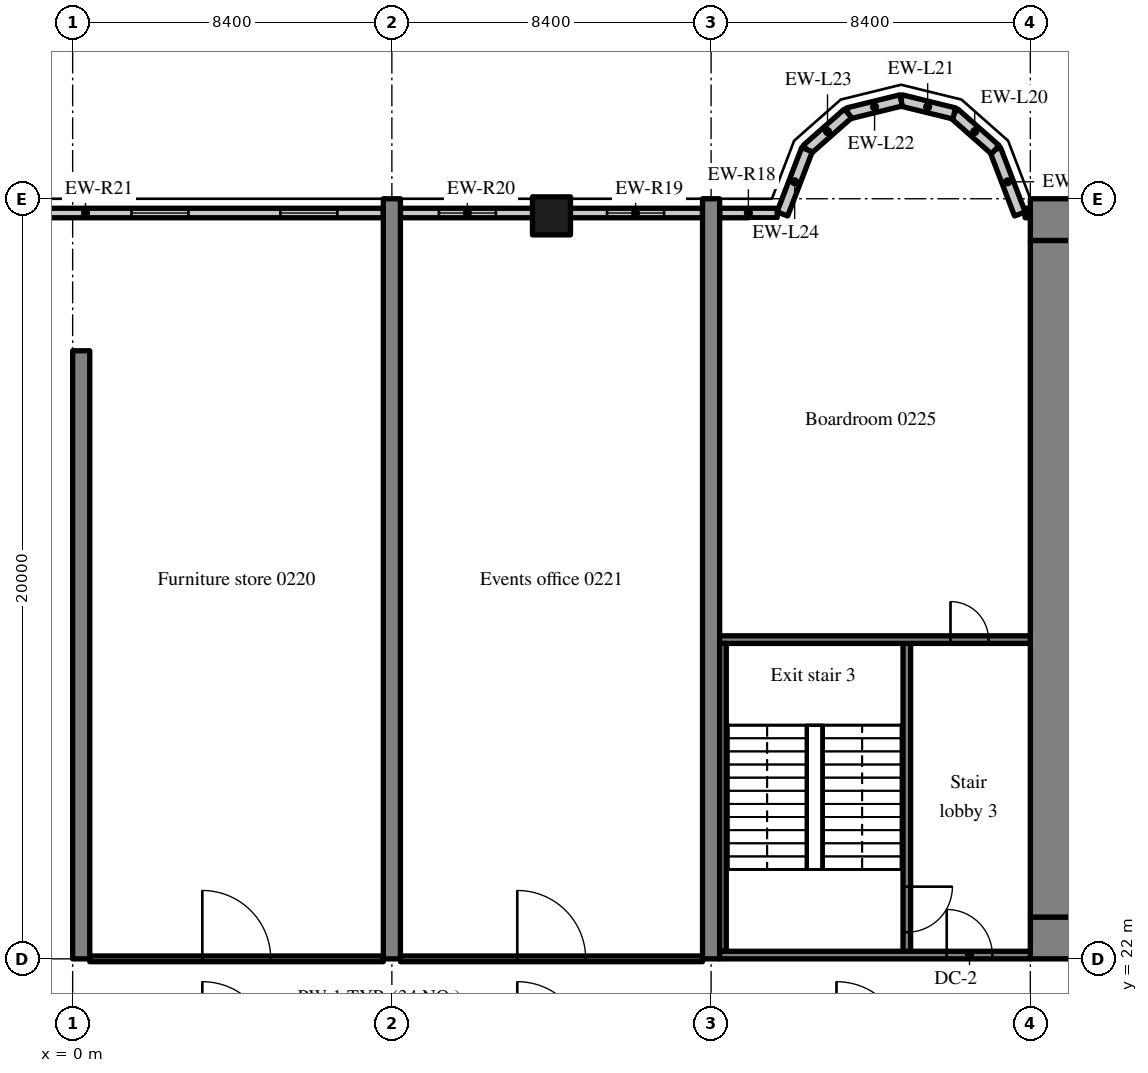
"""IFC4 building model, lengths in metres.
Left out: names, types, materials, properties, quantities, classifications, styles, units other than length and angle.
Written with IfcOpenShell. Run it as: python <this file> out.ifc"""

import sys

from ifc_helpers import new_model, si_unit, direction, frame, frame_2d, origin, origin_2d, place, context, subcontext, project, spatial, rectangle, extrude, source, transform, mapped, element, fill, save


model = new_model("IFC4")
c1 = context("Model", 3, precision=1e-05, world=origin(), true_north=direction((0.0, 1.0)))
c2 = subcontext(c1, "Body", "Model", "MODEL_VIEW")
j1 = project(units=[si_unit("LENGTHUNIT", "METRE"), si_unit("PLANEANGLEUNIT", "RADIAN")], contexts=[c1])
p1 = place(None, origin())
s1 = spatial("IfcSite", under=j1, at=p1, CompositionType="ELEMENT")
p2 = place(p1, origin())
s2 = spatial("IfcBuilding", under=s1, at=p2, CompositionType="ELEMENT")
p3 = place(p2, frame((0.0, 0.0, 11.4)))
s3 = spatial("IfcBuildingStorey", under=s2, at=p3, CompositionType="ELEMENT", Elevation=11.4)
m1 = source(origin(), c2, "Body", "SweptSolid", [
    extrude(rectangle(XDim=50.4, YDim=1.1, at=frame_2d((25.2, 0.0))), origin(), (0.0, 0.0, 1.0), 6.32),
])
p4 = place(p3, frame((25.2, 22.55, 0.0), z_axis=(0.0, 0.0, 1.0), x_axis=(1.0, 0.0, 0.0)))
e1 = element("IfcWall", 1, at=p4, inside=s3, PredefinedType="SHEAR", context=c2, shape_type="MappedRepresentation", body=[
    mapped(m1, transform((0.0, 0.0, 0.0), scale=1.0)),
])
m2 = source(origin(), c2, "Body", "SweptSolid", [
    extrude(rectangle(XDim=1.8, YDim=2.1, at=frame_2d((0.9, 1.05))), frame((0.0, 0.56, 0.0), z_axis=(0.0, -1.0, 0.0), x_axis=(1.0, 0.0, 0.0)), (0.0, 0.0, 1.0), 1.12),
])
p5 = place(p4, frame((15.9, 0.0, 0.0)))
e2 = element("IfcOpeningElement", 2, at=p5, cuts=e1, PredefinedType="OPENING", context=c2, shape_type="MappedRepresentation", body=[
    mapped(m2, transform((0.0, 0.0, 0.0), scale=1.0)),
])
m3 = source(origin(), c2, "Body", "SweptSolid", [
    extrude(rectangle(XDim=1.2, YDim=2.1, at=frame_2d((0.6, 1.05))), frame((0.0, 0.56, 0.0), z_axis=(0.0, -1.0, 0.0), x_axis=(1.0, 0.0, 0.0)), (0.0, 0.0, 1.0), 1.12),
])
p6 = place(p4, frame((27.0, 0.0, 0.0)))
e3 = element("IfcOpeningElement", 3, at=p6, cuts=e1, PredefinedType="OPENING", context=c2, shape_type="MappedRepresentation", body=[
    mapped(m3, transform((0.0, 0.0, 0.0), scale=1.0)),
])
m4 = source(origin(), c2, "Body", "SweptSolid", [
    extrude(rectangle(XDim=0.9, YDim=2.1, at=frame_2d((0.45, 1.05))), frame((0.0, 0.56, 0.0), z_axis=(0.0, -1.0, 0.0), x_axis=(1.0, 0.0, 0.0)), (0.0, 0.0, 1.0), 1.12),
])
p7 = place(p4, frame((34.5, 0.0, 0.0)))
e4 = element("IfcOpeningElement", 4, at=p7, cuts=e1, PredefinedType="OPENING", context=c2, shape_type="MappedRepresentation", body=[
    mapped(m4, transform((0.0, 0.0, 0.0), scale=1.0)),
])
p8 = place(p4, frame((31.5, 0.0, 0.0)))
e5 = element("IfcOpeningElement", 5, at=p8, cuts=e1, PredefinedType="OPENING", context=c2, shape_type="MappedRepresentation", body=[
    mapped(m4, transform((0.0, 0.0, 0.0), scale=1.0)),
])
p9 = place(p4, frame((39.75, 0.0, 0.0)))
e6 = element("IfcOpeningElement", 6, at=p9, cuts=e1, PredefinedType="OPENING", context=c2, shape_type="MappedRepresentation", body=[
    mapped(m4, transform((0.0, 0.0, 0.0), scale=1.0)),
])
p10 = place(p4, frame((36.75, 0.0, 0.0)))
e7 = element("IfcOpeningElement", 7, at=p10, cuts=e1, PredefinedType="OPENING", context=c2, shape_type="MappedRepresentation", body=[
    mapped(m4, transform((0.0, 0.0, 0.0), scale=1.0)),
])
p11 = place(p4, frame((6.425, 0.0, 0.0)))
e8 = element("IfcOpeningElement", 8, at=p11, cuts=e1, PredefinedType="OPENING", context=c2, shape_type="MappedRepresentation", body=[
    mapped(m3, transform((0.0, 0.0, 0.0), scale=1.0)),
])
p12 = place(p4, frame((47.675, 0.0, 0.0)))
e9 = element("IfcOpeningElement", 9, at=p12, cuts=e1, PredefinedType="OPENING", context=c2, shape_type="MappedRepresentation", body=[
    mapped(m3, transform((0.0, 0.0, 0.0), scale=1.0)),
])
p13 = place(p3, frame((25.2, 41.45, 0.0), z_axis=(0.0, 0.0, 1.0), x_axis=(1.0, 0.0, 0.0)))
e10 = element("IfcWall", 10, at=p13, inside=s3, PredefinedType="SHEAR", context=c2, shape_type="MappedRepresentation", body=[
    mapped(m1, transform((0.0, 0.0, 0.0), scale=1.0)),
])
m5 = source(origin(), c2, "Body", "SweptSolid", [
    extrude(rectangle(XDim=17.8, YDim=1.1, at=frame_2d((8.9, 0.0))), origin(), (0.0, 0.0, 1.0), 6.32),
])
p14 = place(p3, frame((25.75, 23.1, 0.0), z_axis=(0.0, 0.0, 1.0), x_axis=(0.0, 1.0, 0.0)))
e11 = element("IfcWall", 11, at=p14, inside=s3, PredefinedType="SHEAR", context=c2, shape_type="MappedRepresentation", body=[
    mapped(m5, transform((0.0, 0.0, 0.0), scale=1.0)),
])
m6 = source(origin(), c2, "Body", "SweptSolid", [
    extrude(rectangle(XDim=16.0, YDim=0.45, at=frame_2d((8.0, 0.0))), origin(), (0.0, 0.0, 1.0), 6.32),
])
p15 = place(p3, frame((0.225, 22.0, 0.0), z_axis=(0.0, 0.0, 1.0), x_axis=(0.0, 1.0, 0.0)))
e12 = element("IfcWall", 12, at=p15, inside=s3, PredefinedType="SHEAR", context=c2, shape_type="MappedRepresentation", body=[
    mapped(m6, transform((0.0, 0.0, 0.0), scale=1.0)),
])
m7 = source(origin(), c2, "Body", "SweptSolid", [
    extrude(rectangle(XDim=20.0, YDim=0.45, at=frame_2d((10.0, 0.0))), origin(), (0.0, 0.0, 1.0), 6.32),
])
for number, where, z_axis, x_axis in (
    (13, (8.4, 22.0, 0.0), (0.0, 0.0, 1.0), (0.0, 1.0, 0.0)),
    (14, (16.8, 22.0, 0.0), (0.0, 0.0, 1.0), (0.0, 1.0, 0.0)),
):
    element("IfcWall", number, at=place(p3, frame(where, z_axis=z_axis, x_axis=x_axis)), inside=s3, PredefinedType="SHEAR", context=c2, shape_type="MappedRepresentation", body=[
        mapped(m7, transform((0.0, 0.0, 0.0), scale=1.0)),
    ])
m8 = source(origin(), c2, "Body", "SweptSolid", [
    extrude(rectangle(XDim=1.0, YDim=1.0, at=origin_2d()), origin(), (0.0, 0.0, 1.0), 6.32),
])
p16 = place(p3, frame((12.6, 41.55, 0.0), z_axis=(0.0, 0.0, 1.0), x_axis=(1.0, 0.0, 0.0)))
e15 = element("IfcColumn", 15, at=p16, inside=s3, PredefinedType="COLUMN", context=c2, shape_type="MappedRepresentation", body=[
    mapped(m8, transform((0.0, 0.0, 0.0), scale=1.0)),
])
m9 = source(origin(), c2, "Body", "SweptSolid", [
    extrude(rectangle(XDim=0.138, YDim=0.25, at=frame_2d((0.069, 0.0))), origin(), (0.0, 0.0, 1.0), 5.57),
])
p17 = place(p3, frame((25.2, 41.625, 0.0), z_axis=(0.0, 0.0, 1.0), x_axis=(-1.0, 0.0, 0.0)))
e16 = element("IfcWall", 16, at=p17, inside=s3, PredefinedType="SOLIDWALL", context=c2, shape_type="MappedRepresentation", body=[
    mapped(m9, transform((0.0, 0.0, 0.0), scale=1.0)),
])
m10 = source(origin(), c2, "Body", "SweptSolid", [
    extrude(rectangle(XDim=1.812, YDim=0.3, at=frame_2d((0.906, 0.0))), origin(), (0.0, 0.0, 1.0), 6.32),
])
p18 = place(p3, frame((24.925, 41.6, 0.0), z_axis=(0.0, 0.0, 1.0), x_axis=(-0.357759776872, 0.933813654886, 0.0)))
e17 = element("IfcWall", 17, at=p18, inside=s3, PredefinedType="SOLIDWALL", context=c2, shape_type="MappedRepresentation", body=[
    mapped(m10, transform((0.0, 0.0, 0.0), scale=1.0)),
])
m11 = source(origin(), c2, "Body", "SweptSolid", [
    extrude(rectangle(XDim=1.44, YDim=0.3, at=frame_2d((0.72, 0.0))), origin(), (0.0, 0.0, 1.0), 6.32),
])
p19 = place(p3, frame((24.277, 43.292, 0.0), z_axis=(0.0, 0.0, 1.0), x_axis=(-0.749649827867, 0.661834673902, 0.0)))
e18 = element("IfcWall", 18, at=p19, inside=s3, PredefinedType="SOLIDWALL", context=c2, shape_type="MappedRepresentation", body=[
    mapped(m11, transform((0.0, 0.0, 0.0), scale=1.0)),
])
m12 = source(origin(), c2, "Body", "SweptSolid", [
    extrude(rectangle(XDim=1.438, YDim=0.3, at=frame_2d((0.719, 0.0))), origin(), (0.0, 0.0, 1.0), 6.32),
])
p20 = place(p3, frame((23.197, 44.245, 0.0), z_axis=(0.0, 0.0, 1.0), x_axis=(-0.971152283879, 0.238460146601, 0.0)))
e19 = element("IfcWall", 19, at=p20, inside=s3, PredefinedType="SOLIDWALL", context=c2, shape_type="MappedRepresentation", body=[
    mapped(m12, transform((0.0, 0.0, 0.0), scale=1.0)),
])
m13 = source(origin(), c2, "Body", "SweptSolid", [
    extrude(rectangle(XDim=1.439, YDim=0.3, at=frame_2d((0.719, 0.0))), origin(), (0.0, 0.0, 1.0), 6.32),
])
p21 = place(p3, frame((21.8, 44.588, 0.0), z_axis=(0.0, 0.0, 1.0), x_axis=(-0.971161932466, -0.238420848351, 0.0)))
e20 = element("IfcWall", 20, at=p21, inside=s3, PredefinedType="SOLIDWALL", context=c2, shape_type="MappedRepresentation", body=[
    mapped(m13, transform((0.0, 0.0, 0.0), scale=1.0)),
])
m14 = source(origin(), c2, "Body", "SweptSolid", [
    extrude(rectangle(XDim=1.44, YDim=0.3, at=frame_2d((0.72, 0.0))), origin(), (0.0, 0.0, 1.0), 6.32),
])
p22 = place(p3, frame((20.403, 44.245, 0.0), z_axis=(0.0, 0.0, 1.0), x_axis=(-0.74957555648, -0.661918790432, 0.0)))
e21 = element("IfcWall", 21, at=p22, inside=s3, PredefinedType="SOLIDWALL", context=c2, shape_type="MappedRepresentation", body=[
    mapped(m14, transform((0.0, 0.0, 0.0), scale=1.0)),
])
m15 = source(origin(), c2, "Body", "SweptSolid", [
    extrude(rectangle(XDim=1.812, YDim=0.3, at=frame_2d((0.906, 0.0))), origin(), (0.0, 0.0, 1.0), 6.32),
])
p23 = place(p3, frame((19.323, 43.292, 0.0), z_axis=(0.0, 0.0, 1.0), x_axis=(-0.357877270961, -0.93376863244, 0.0)))
e22 = element("IfcWall", 22, at=p23, inside=s3, PredefinedType="SOLIDWALL", context=c2, shape_type="MappedRepresentation", body=[
    mapped(m15, transform((0.0, 0.0, 0.0), scale=1.0)),
])
m16 = source(origin(), c2, "Body", "SweptSolid", [
    extrude(rectangle(XDim=1.513, YDim=0.25, at=frame_2d((0.756, 0.0))), origin(), (0.0, 0.0, 1.0), 5.57),
])
p24 = place(p3, frame((18.538, 41.625, 0.0), z_axis=(0.0, 0.0, 1.0), x_axis=(-1.0, 0.0, 0.0)))
e23 = element("IfcWall", 23, at=p24, inside=s3, PredefinedType="SOLIDWALL", context=c2, shape_type="MappedRepresentation", body=[
    mapped(m16, transform((0.0, 0.0, 0.0), scale=1.0)),
])
m17 = source(origin(), c2, "Body", "SweptSolid", [
    extrude(rectangle(XDim=3.525, YDim=0.25, at=frame_2d((1.762, 0.0))), origin(), (0.0, 0.0, 1.0), 5.57),
])
p25 = place(p3, frame((16.575, 41.625, 0.0), z_axis=(0.0, 0.0, 1.0), x_axis=(-1.0, 0.0, 0.0)))
e24 = element("IfcWall", 24, at=p25, inside=s3, PredefinedType="SOLIDWALL", context=c2, shape_type="MappedRepresentation", body=[
    mapped(m17, transform((0.0, 0.0, 0.0), scale=1.0)),
])
m18 = source(origin(), c2, "Body", "SweptSolid", [
    extrude(rectangle(XDim=1.5, YDim=1.5, at=frame_2d((0.75, 0.75))), frame((0.0, 0.135, 0.0), z_axis=(0.0, -1.0, 0.0), x_axis=(1.0, 0.0, 0.0)), (0.0, 0.0, 1.0), 0.27),
])
p26 = place(p25, frame((1.012, 0.0, 0.9)))
e25 = element("IfcOpeningElement", 25, at=p26, cuts=e24, PredefinedType="OPENING", context=c2, shape_type="MappedRepresentation", body=[
    mapped(m18, transform((0.0, 0.0, 0.0), scale=1.0)),
])
p27 = place(p3, frame((12.15, 41.625, 0.0), z_axis=(0.0, 0.0, 1.0), x_axis=(-1.0, 0.0, 0.0)))
e26 = element("IfcWall", 26, at=p27, inside=s3, PredefinedType="SOLIDWALL", context=c2, shape_type="MappedRepresentation", body=[
    mapped(m17, transform((0.0, 0.0, 0.0), scale=1.0)),
])
p28 = place(p27, frame((1.012, 0.0, 0.9)))
e27 = element("IfcOpeningElement", 27, at=p28, cuts=e26, PredefinedType="OPENING", context=c2, shape_type="MappedRepresentation", body=[
    mapped(m18, transform((0.0, 0.0, 0.0), scale=1.0)),
])
m19 = source(origin(), c2, "Body", "SweptSolid", [
    extrude(rectangle(XDim=15.675, YDim=0.25, at=frame_2d((7.837, 0.0))), origin(), (0.0, 0.0, 1.0), 5.57),
])
p29 = place(p3, frame((8.175, 41.625, 0.0), z_axis=(0.0, 0.0, 1.0), x_axis=(-1.0, 0.0, 0.0)))
e28 = element("IfcWall", 28, at=p29, inside=s3, PredefinedType="SOLIDWALL", context=c2, shape_type="MappedRepresentation", body=[
    mapped(m19, transform((0.0, 0.0, 0.0), scale=1.0)),
])
p30 = place(p29, frame((1.209, 0.0, 0.9)))
e29 = element("IfcOpeningElement", 29, at=p30, cuts=e28, PredefinedType="OPENING", context=c2, shape_type="MappedRepresentation", body=[
    mapped(m18, transform((0.0, 0.0, 0.0), scale=1.0)),
])
p31 = place(p29, frame((5.128, 0.0, 0.9)))
e30 = element("IfcOpeningElement", 30, at=p31, cuts=e28, PredefinedType="OPENING", context=c2, shape_type="MappedRepresentation", body=[
    mapped(m18, transform((0.0, 0.0, 0.0), scale=1.0)),
])
p32 = place(p29, frame((9.047, 0.0, 0.9)))
e31 = element("IfcOpeningElement", 31, at=p32, cuts=e28, PredefinedType="OPENING", context=c2, shape_type="MappedRepresentation", body=[
    mapped(m18, transform((0.0, 0.0, 0.0), scale=1.0)),
])
p33 = place(p29, frame((12.966, 0.0, 0.9)))
e32 = element("IfcOpeningElement", 32, at=p33, cuts=e28, PredefinedType="OPENING", context=c2, shape_type="MappedRepresentation", body=[
    mapped(m18, transform((0.0, 0.0, 0.0), scale=1.0)),
])
m20 = source(origin(), c2, "Body", "SweptSolid", [
    extrude(rectangle(XDim=8.3, YDim=0.2, at=frame_2d((4.15, 0.0))), origin(), (0.0, 0.0, 1.0), 6.32),
])
p34 = place(p3, frame((21.95, 22.1, 0.0), z_axis=(0.0, 0.0, 1.0), x_axis=(0.0, 1.0, 0.0)))
e33 = element("IfcWall", 33, at=p34, inside=s3, PredefinedType="SOLIDWALL", context=c2, shape_type="MappedRepresentation", body=[
    mapped(m20, transform((0.0, 0.0, 0.0), scale=1.0)),
])
m21 = source(origin(), c2, "Body", "SweptSolid", [
    extrude(rectangle(XDim=1.2, YDim=2.1, at=frame_2d((0.6, 1.05))), frame((0.0, 0.11, 0.0), z_axis=(0.0, -1.0, 0.0), x_axis=(1.0, 0.0, 0.0)), (0.0, 0.0, 1.0), 0.22),
])
p35 = place(p34, frame((0.6, 0.0, 0.0)))
e34 = element("IfcOpeningElement", 34, at=p35, cuts=e33, PredefinedType="OPENING", context=c2, shape_type="MappedRepresentation", body=[
    mapped(m21, transform((0.0, 0.0, 0.0), scale=1.0)),
])
m22 = source(origin(), c2, "Body", "SweptSolid", [
    extrude(rectangle(XDim=8.175, YDim=0.2, at=frame_2d((4.087, 0.0))), origin(), (0.0, 0.0, 1.0), 6.32),
])
p36 = place(p3, frame((17.025, 22.1, 0.0), z_axis=(0.0, 0.0, 1.0), x_axis=(1.0, 0.0, 0.0)))
e35 = element("IfcWall", 35, at=p36, inside=s3, PredefinedType="SOLIDWALL", context=c2, shape_type="MappedRepresentation", body=[
    mapped(m22, transform((0.0, 0.0, 0.0), scale=1.0)),
])
p37 = place(p36, frame((5.975, 0.0, 0.0)))
e36 = element("IfcOpeningElement", 36, at=p37, cuts=e35, PredefinedType="OPENING", context=c2, shape_type="MappedRepresentation", body=[
    mapped(m21, transform((0.0, 0.0, 0.0), scale=1.0)),
])
p38 = place(p3, frame((17.025, 30.4, 0.0), z_axis=(0.0, 0.0, 1.0), x_axis=(1.0, 0.0, 0.0)))
e37 = element("IfcWall", 37, at=p38, inside=s3, PredefinedType="SOLIDWALL", context=c2, shape_type="MappedRepresentation", body=[
    mapped(m22, transform((0.0, 0.0, 0.0), scale=1.0)),
])
m23 = source(origin(), c2, "Body", "SweptSolid", [
    extrude(rectangle(XDim=1.0, YDim=2.1, at=frame_2d((0.5, 1.05))), frame((0.0, 0.11, 0.0), z_axis=(0.0, -1.0, 0.0), x_axis=(1.0, 0.0, 0.0)), (0.0, 0.0, 1.0), 0.22),
])
p39 = place(p38, frame((6.075, 0.0, 0.0)))
e38 = element("IfcOpeningElement", 38, at=p39, cuts=e37, PredefinedType="OPENING", context=c2, shape_type="MappedRepresentation", body=[
    mapped(m23, transform((0.0, 0.0, 0.0), scale=1.0)),
])
m24 = source(origin(), c2, "Body", "SweptSolid", [
    extrude(rectangle(XDim=8.1, YDim=0.175, at=frame_2d((4.05, 0.0))), origin(), (0.0, 0.0, 1.0), 6.32),
])
p40 = place(p3, frame((17.112, 22.2, 0.0), z_axis=(0.0, 0.0, 1.0), x_axis=(0.0, 1.0, 0.0)))
e39 = element("IfcWall", 39, at=p40, inside=s3, PredefinedType="SOLIDWALL", context=c2, shape_type="MappedRepresentation", body=[
    mapped(m24, transform((0.0, 0.0, 0.0), scale=1.0)),
])
m25 = source(origin(), c2, "Body", "SweptSolid", [
    extrude(rectangle(XDim=7.725, YDim=0.15, at=frame_2d((3.863, 0.0))), origin(), (0.0, 0.0, 1.0), 5.62),
])
p41 = place(p3, frame((0.45, 22.0, 0.0), z_axis=(0.0, 0.0, 1.0), x_axis=(1.0, 0.0, 0.0)))
e40 = element("IfcWall", 40, at=p41, inside=s3, PredefinedType="PARTITIONING", context=c2, shape_type="MappedRepresentation", body=[
    mapped(m25, transform((0.0, 0.0, 0.0), scale=1.0)),
])
m26 = source(origin(), c2, "Body", "SweptSolid", [
    extrude(rectangle(XDim=1.8, YDim=2.1, at=frame_2d((0.9, 1.05))), frame((0.0, 0.085, 0.0), z_axis=(0.0, -1.0, 0.0), x_axis=(1.0, 0.0, 0.0)), (0.0, 0.0, 1.0), 0.17),
])
p42 = place(p41, frame((2.962, 0.0, 0.0)))
e41 = element("IfcOpeningElement", 41, at=p42, cuts=e40, PredefinedType="OPENING", context=c2, shape_type="MappedRepresentation", body=[
    mapped(m26, transform((0.0, 0.0, 0.0), scale=1.0)),
])
m27 = source(origin(), c2, "Body", "SweptSolid", [
    extrude(rectangle(XDim=7.95, YDim=0.15, at=frame_2d((3.975, 0.0))), origin(), (0.0, 0.0, 1.0), 5.62),
])
p43 = place(p3, frame((8.625, 22.0, 0.0), z_axis=(0.0, 0.0, 1.0), x_axis=(1.0, 0.0, 0.0)))
e42 = element("IfcWall", 42, at=p43, inside=s3, PredefinedType="PARTITIONING", context=c2, shape_type="MappedRepresentation", body=[
    mapped(m27, transform((0.0, 0.0, 0.0), scale=1.0)),
])
p44 = place(p43, frame((3.075, 0.0, 0.0)))
e43 = element("IfcOpeningElement", 43, at=p44, cuts=e42, PredefinedType="OPENING", context=c2, shape_type="MappedRepresentation", body=[
    mapped(m26, transform((0.0, 0.0, 0.0), scale=1.0)),
])
m28 = source(origin(), c2, "Body", "SweptSolid", [
    extrude(rectangle(XDim=1.5, YDim=1.5, at=frame_2d((0.75, 0.75))), frame((0.0, 0.03, 0.0), z_axis=(0.0, -1.0, 0.0), x_axis=(1.0, 0.0, 0.0)), (0.0, 0.0, 1.0), 0.06),
])
p45 = place(p26, origin())
e44 = element("IfcWindow", 44, at=p45, inside=s3, PartitioningType="SINGLE_PANEL", PredefinedType="WINDOW", context=c2, shape_type="MappedRepresentation", body=[
    mapped(m28, transform((0.0, 0.0, 0.0), scale=1.0)),
])
fill(e25, e44)
p46 = place(p28, origin())
e45 = element("IfcWindow", 45, at=p46, inside=s3, PartitioningType="SINGLE_PANEL", PredefinedType="WINDOW", context=c2, shape_type="MappedRepresentation", body=[
    mapped(m28, transform((0.0, 0.0, 0.0), scale=1.0)),
])
fill(e27, e45)
p47 = place(p30, origin())
e46 = element("IfcWindow", 46, at=p47, inside=s3, PartitioningType="SINGLE_PANEL", PredefinedType="WINDOW", context=c2, shape_type="MappedRepresentation", body=[
    mapped(m28, transform((0.0, 0.0, 0.0), scale=1.0)),
])
fill(e29, e46)
p48 = place(p31, origin())
e47 = element("IfcWindow", 47, at=p48, inside=s3, PartitioningType="SINGLE_PANEL", PredefinedType="WINDOW", context=c2, shape_type="MappedRepresentation", body=[
    mapped(m28, transform((0.0, 0.0, 0.0), scale=1.0)),
])
fill(e30, e47)
m29 = source(origin(), c2, "Body", "SweptSolid", [
    extrude(rectangle(XDim=1.2, YDim=2.1, at=frame_2d((0.6, 1.05))), frame((0.0, 0.025, 0.0), z_axis=(0.0, -1.0, 0.0), x_axis=(1.0, 0.0, 0.0)), (0.0, 0.0, 1.0), 0.05),
])
p49 = place(p35, origin())
e48 = element("IfcDoor", 48, at=p49, inside=s3, OperationType="SINGLE_SWING_RIGHT", PredefinedType="DOOR", context=c2, shape_type="MappedRepresentation", body=[
    mapped(m29, transform((0.0, 0.0, 0.0), scale=1.0)),
])
fill(e34, e48)
p50 = place(p37, origin())
e49 = element("IfcDoor", 49, at=p50, inside=s3, OperationType="SINGLE_SWING_LEFT", PredefinedType="DOOR", context=c2, shape_type="MappedRepresentation", body=[
    mapped(m29, transform((0.0, 0.0, 0.0), scale=1.0)),
])
fill(e36, e49)
m30 = source(origin(), c2, "Body", "SweptSolid", [
    extrude(rectangle(XDim=1.0, YDim=2.1, at=frame_2d((0.5, 1.05))), frame((0.0, 0.025, 0.0), z_axis=(0.0, -1.0, 0.0), x_axis=(1.0, 0.0, 0.0)), (0.0, 0.0, 1.0), 0.05),
])
p51 = place(p39, origin())
e50 = element("IfcDoor", 50, at=p51, inside=s3, OperationType="SINGLE_SWING_LEFT", PredefinedType="DOOR", context=c2, shape_type="MappedRepresentation", body=[
    mapped(m30, transform((0.0, 0.0, 0.0), scale=1.0)),
])
fill(e38, e50)
m31 = source(origin(), c2, "Body", "SweptSolid", [
    extrude(rectangle(XDim=1.8, YDim=2.1, at=frame_2d((0.9, 1.05))), frame((0.0, 0.025, 0.0), z_axis=(0.0, -1.0, 0.0), x_axis=(1.0, 0.0, 0.0)), (0.0, 0.0, 1.0), 0.05),
])
p52 = place(p42, origin())
e51 = element("IfcDoor", 51, at=p52, inside=s3, OperationType="DOUBLE_DOOR_SINGLE_SWING", PredefinedType="DOOR", context=c2, shape_type="MappedRepresentation", body=[
    mapped(m31, transform((0.0, 0.0, 0.0), scale=1.0)),
])
fill(e41, e51)
p53 = place(p44, origin())
e52 = element("IfcDoor", 52, at=p53, inside=s3, OperationType="DOUBLE_DOOR_SINGLE_SWING", PredefinedType="DOOR", context=c2, shape_type="MappedRepresentation", body=[
    mapped(m31, transform((0.0, 0.0, 0.0), scale=1.0)),
])
fill(e43, e52)
save(model, sys.argv[1])
